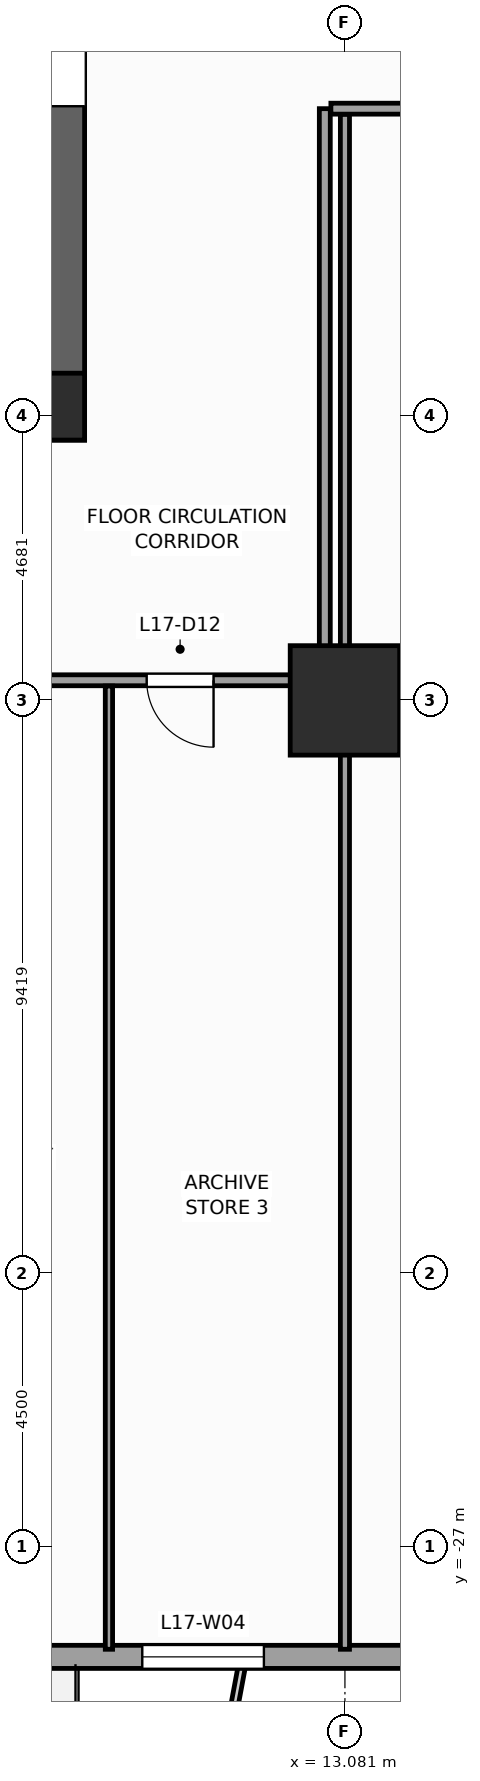
"""IFC4 building model, lengths in metres.
Left out: names, types, materials, properties, quantities, classifications, styles, units other than length and angle.
Written with IfcOpenShell. Run it as: python <this file> out.ifc"""

import sys

from ifc_helpers import new_model, si_unit, direction, frame, frame_2d, origin, origin_2d, place, context, subcontext, project, spatial, rectangle, extrude, source, transform, mapped, element, fill, save


model = new_model("IFC4")
c1 = context("Model", 3, precision=1e-05, world=origin(), true_north=direction((0.0, 1.0)))
c2 = subcontext(c1, "Body", "Model", "MODEL_VIEW")
j1 = project(units=[si_unit("LENGTHUNIT", "METRE"), si_unit("PLANEANGLEUNIT", "RADIAN")], contexts=[c1])
p1 = place(None, origin())
s1 = spatial("IfcSite", under=j1, at=p1, CompositionType="ELEMENT")
p2 = place(p1, origin())
s2 = spatial("IfcBuilding", under=s1, at=p2, CompositionType="ELEMENT")
p3 = place(p2, frame((0.0, 0.0, 74.0)))
s3 = spatial("IfcBuildingStorey", under=s2, at=p3, CompositionType="ELEMENT", Elevation=74.0)
p4 = place(p3, frame((-8.8, -8.4, 0.0), z_axis=(0.0, 0.0, 1.0), x_axis=(1.0, 0.0, 0.0)))
e1 = element("IfcWall", 1, at=p4, inside=s3, PredefinedType="SHEAR", context=c2, shape_type="SweptSolid", body=[
    extrude(rectangle(XDim=17.6, YDim=0.8, at=frame_2d((8.8, 0.0))), origin(), (0.0, 0.0, 1.0), 4.0),
])
p5 = place(p4, frame((8.15, 0.0, 0.0)))
e2 = element("IfcOpeningElement", 2, at=p5, cuts=e1, PredefinedType="OPENING", context=c2, shape_type="SweptSolid", body=[
    extrude(rectangle(XDim=1.3, YDim=2.2, at=frame_2d((0.65, 1.1))), frame((0.0, 0.41, 0.0), z_axis=(0.0, -1.0, 0.0), x_axis=(1.0, 0.0, 0.0)), (0.0, 0.0, 1.0), 0.82),
])
p6 = place(p3, frame((8.4, -8.0, 0.0), z_axis=(0.0, 0.0, 1.0), x_axis=(0.0, 1.0, 0.0)))
e3 = element("IfcWall", 3, at=p6, inside=s3, PredefinedType="SHEAR", context=c2, shape_type="SweptSolid", body=[
    extrude(rectangle(XDim=16.0, YDim=0.8, at=frame_2d((8.0, 0.0))), origin(), (0.0, 0.0, 1.0), 4.0),
])
p7 = place(p6, frame((4.69, 0.0, 0.0)))
e4 = element("IfcOpeningElement", 4, at=p7, cuts=e3, PredefinedType="OPENING", context=c2, shape_type="SweptSolid", body=[
    extrude(rectangle(XDim=1.3, YDim=2.2, at=frame_2d((0.65, 1.1))), frame((0.0, 0.41, 0.0), z_axis=(0.0, -1.0, 0.0), x_axis=(1.0, 0.0, 0.0)), (0.0, 0.0, 1.0), 0.82),
])
m1 = source(origin(), c2, "Body", "SweptSolid", [
    extrude(rectangle(XDim=1.1, YDim=1.1, at=origin_2d()), origin(), (0.0, 0.0, 1.0), 4.0),
])
p8 = place(p3, frame((8.25, -8.25, 0.0), z_axis=(0.0, 0.0, 1.0), x_axis=(1.0, 0.0, 0.0)))
e5 = element("IfcColumn", 5, at=p8, inside=s3, PredefinedType="PILASTER", context=c2, shape_type="MappedRepresentation", body=[
    mapped(m1, transform((0.0, 0.0, 0.0), scale=1.0)),
])
m2 = source(origin(), c2, "Body", "SweptSolid", [
    extrude(rectangle(XDim=1.8, YDim=1.8, at=origin_2d()), origin(), (0.0, 0.0, 1.0), 4.0),
])
p9 = place(p3, frame((13.081, -13.081, 0.0), z_axis=(0.0, 0.0, 1.0), x_axis=(1.0, 0.0, 0.0)))
e6 = element("IfcColumn", 6, at=p9, inside=s3, PredefinedType="COLUMN", context=c2, shape_type="MappedRepresentation", body=[
    mapped(m2, transform((0.0, 0.0, 0.0), scale=1.0)),
])
p10 = place(p3, frame((-25.69, -28.81, 0.0), z_axis=(0.0, 0.0, 1.0), x_axis=(1.0, 0.0, 0.0)))
e7 = element("IfcWall", 7, at=p10, inside=s3, PredefinedType="STANDARD", context=c2, shape_type="SweptSolid", body=[
    extrude(rectangle(XDim=51.38, YDim=0.38, at=frame_2d((25.69, 0.0))), origin(), (0.0, 0.0, 1.0), 2.2),
])
p11 = place(p10, frame((31.615, 0.0, 0.0)))
e8 = element("IfcOpeningElement", 8, at=p11, cuts=e7, PredefinedType="OPENING", context=c2, shape_type="SweptSolid", body=[
    extrude(rectangle(XDim=1.05, YDim=2.02, at=frame_2d((0.525, 1.01))), frame((0.0, 0.2, 0.0), z_axis=(0.0, -1.0, 0.0), x_axis=(1.0, 0.0, 0.0)), (0.0, 0.0, 1.0), 0.4),
])
p12 = place(p10, frame((5.166, 0.0, 0.67)))
e9 = element("IfcOpeningElement", 9, at=p12, cuts=e7, PredefinedType="OPENING", context=c2, shape_type="SweptSolid", body=[
    extrude(rectangle(XDim=2.0, YDim=1.45, at=frame_2d((1.0, 0.725))), frame((0.0, 0.2, 0.0), z_axis=(0.0, -1.0, 0.0), x_axis=(1.0, 0.0, 0.0)), (0.0, 0.0, 1.0), 0.4),
])
p13 = place(p10, frame((13.9, 0.0, 0.67)))
e10 = element("IfcOpeningElement", 10, at=p13, cuts=e7, PredefinedType="OPENING", context=c2, shape_type="SweptSolid", body=[
    extrude(rectangle(XDim=2.0, YDim=1.45, at=frame_2d((1.0, 0.725))), frame((0.0, 0.2, 0.0), z_axis=(0.0, -1.0, 0.0), x_axis=(1.0, 0.0, 0.0)), (0.0, 0.0, 1.0), 0.4),
])
p14 = place(p10, frame((22.912, 0.0, 0.67)))
e11 = element("IfcOpeningElement", 11, at=p14, cuts=e7, PredefinedType="OPENING", context=c2, shape_type="SweptSolid", body=[
    extrude(rectangle(XDim=2.0, YDim=1.45, at=frame_2d((1.0, 0.725))), frame((0.0, 0.2, 0.0), z_axis=(0.0, -1.0, 0.0), x_axis=(1.0, 0.0, 0.0)), (0.0, 0.0, 1.0), 0.4),
])
p15 = place(p10, frame((35.438, 0.0, 0.67)))
e12 = element("IfcOpeningElement", 12, at=p15, cuts=e7, PredefinedType="OPENING", context=c2, shape_type="SweptSolid", body=[
    extrude(rectangle(XDim=2.0, YDim=1.45, at=frame_2d((1.0, 0.725))), frame((0.0, 0.2, 0.0), z_axis=(0.0, -1.0, 0.0), x_axis=(1.0, 0.0, 0.0)), (0.0, 0.0, 1.0), 0.4),
])
p16 = place(p10, frame((43.187, 0.0, 0.67)))
e13 = element("IfcOpeningElement", 13, at=p16, cuts=e7, PredefinedType="OPENING", context=c2, shape_type="SweptSolid", body=[
    extrude(rectangle(XDim=2.0, YDim=1.45, at=frame_2d((1.0, 0.725))), frame((0.0, 0.2, 0.0), z_axis=(0.0, -1.0, 0.0), x_axis=(1.0, 0.0, 0.0)), (0.0, 0.0, 1.0), 0.4),
])
p17 = place(p3, frame((3.35, -12.75, 0.0), z_axis=(0.0, 0.0, 1.0), x_axis=(1.0, 0.0, 0.0)))
e14 = element("IfcWall", 14, at=p17, inside=s3, PredefinedType="PARTITIONING", context=c2, shape_type="SweptSolid", body=[
    extrude(rectangle(XDim=9.4, YDim=0.18, at=frame_2d((4.7, 0.0))), origin(), (0.0, 0.0, 1.0), 2.2),
])
p18 = place(p17, frame((3.45, 0.0, 0.0)))
e15 = element("IfcOpeningElement", 15, at=p18, cuts=e14, PredefinedType="OPENING", context=c2, shape_type="SweptSolid", body=[
    extrude(rectangle(XDim=1.1, YDim=2.2, at=frame_2d((0.55, 1.1))), frame((0.0, 0.1, 0.0), z_axis=(0.0, -1.0, 0.0), x_axis=(1.0, 0.0, 0.0)), (0.0, 0.0, 1.0), 0.2),
])
p19 = place(p17, frame((6.47, 0.0, 0.0)))
e16 = element("IfcOpeningElement", 16, at=p19, cuts=e14, PredefinedType="OPENING", context=c2, shape_type="SweptSolid", body=[
    extrude(rectangle(XDim=1.1, YDim=2.2, at=frame_2d((0.55, 1.1))), frame((0.0, 0.1, 0.0), z_axis=(0.0, -1.0, 0.0), x_axis=(1.0, 0.0, 0.0)), (0.0, 0.0, 1.0), 0.2),
])
p20 = place(p3, frame((12.75, -12.75, 0.0), z_axis=(0.0, 0.0, 1.0), x_axis=(0.0, 1.0, 0.0)))
e17 = element("IfcWall", 17, at=p20, inside=s3, PredefinedType="PARTITIONING", context=c2, shape_type="SweptSolid", body=[
    extrude(rectangle(XDim=9.4, YDim=0.18, at=frame_2d((4.7, 0.0))), origin(), (0.0, 0.0, 1.0), 2.2),
])
p21 = place(p3, frame((12.85, -3.35, 0.0), z_axis=(0.0, 0.0, 1.0), x_axis=(1.0, 0.0, 0.0)))
e18 = element("IfcWall", 18, at=p21, inside=s3, PredefinedType="PARTITIONING", context=c2, shape_type="SweptSolid", body=[
    extrude(rectangle(XDim=15.835, YDim=0.18, at=frame_2d((7.917, 0.0))), origin(), (0.0, 0.0, 1.0), 3.6),
])
p22 = place(p21, frame((7.367, 0.0, 0.0)))
e19 = element("IfcOpeningElement", 19, at=p22, cuts=e18, PredefinedType="OPENING", context=c2, shape_type="SweptSolid", body=[
    extrude(rectangle(XDim=1.1, YDim=2.2, at=frame_2d((0.55, 1.1))), frame((0.0, 0.1, 0.0), z_axis=(0.0, -1.0, 0.0), x_axis=(1.0, 0.0, 0.0)), (0.0, 0.0, 1.0), 0.2),
])
p23 = place(p3, frame((9.2, -28.685, 0.0), z_axis=(0.0, 0.0, 1.0), x_axis=(0.0, 1.0, 0.0)))
e20 = element("IfcWall", 20, at=p23, inside=s3, PredefinedType="PARTITIONING", context=c2, shape_type="SweptSolid", body=[
    extrude(rectangle(XDim=15.84, YDim=0.12, at=frame_2d((7.92, 0.0))), origin(), (0.0, 0.0, 1.0), 2.2),
])
p24 = place(p3, frame((13.081, -28.685, 0.0), z_axis=(0.0, 0.0, 1.0), x_axis=(0.0, 1.0, 0.0)))
e21 = element("IfcWall", 21, at=p24, inside=s3, PredefinedType="PARTITIONING", context=c2, shape_type="SweptSolid", body=[
    extrude(rectangle(XDim=25.24, YDim=0.15, at=frame_2d((12.62, 0.0))), origin(), (0.0, 0.0, 1.0), 2.2),
])
m3 = source(origin(), c2, "Body", "SweptSolid", [
    extrude(rectangle(XDim=2.0, YDim=1.45, at=frame_2d((1.0, 0.725))), frame((0.0, 0.03, 0.0), z_axis=(0.0, -1.0, 0.0), x_axis=(1.0, 0.0, 0.0)), (0.0, 0.0, 1.0), 0.06),
])
p25 = place(p15, origin())
e22 = element("IfcWindow", 22, at=p25, inside=s3, PartitioningType="SINGLE_PANEL", PredefinedType="WINDOW", context=c2, shape_type="MappedRepresentation", body=[
    mapped(m3, transform((0.0, 0.0, 0.0), scale=1.0)),
])
fill(e12, e22)
m4 = source(origin(), c2, "Body", "SweptSolid", [
    extrude(rectangle(XDim=1.3, YDim=2.2, at=frame_2d((0.65, 1.1))), frame((0.0, 0.025, 0.0), z_axis=(0.0, -1.0, 0.0), x_axis=(1.0, 0.0, 0.0)), (0.0, 0.0, 1.0), 0.05),
])
p26 = place(p7, origin())
e23 = element("IfcDoor", 23, at=p26, inside=s3, OperationType="SINGLE_SWING_RIGHT", PredefinedType="DOOR", context=c2, shape_type="MappedRepresentation", body=[
    mapped(m4, transform((0.0, 0.0, 0.0), scale=1.0)),
])
fill(e4, e23)
m5 = source(origin(), c2, "Body", "SweptSolid", [
    extrude(rectangle(XDim=1.1, YDim=2.2, at=frame_2d((0.55, 1.1))), frame((0.0, 0.025, 0.0), z_axis=(0.0, -1.0, 0.0), x_axis=(1.0, 0.0, 0.0)), (0.0, 0.0, 1.0), 0.05),
])
p27 = place(p19, frame((1.1, 0.0, 0.0), z_axis=(0.0, 0.0, 1.0), x_axis=(-1.0, 0.0, 0.0)))
e24 = element("IfcDoor", 24, at=p27, inside=s3, OperationType="SINGLE_SWING_RIGHT", PredefinedType="DOOR", context=c2, shape_type="MappedRepresentation", body=[
    mapped(m5, transform((0.0, 0.0, 0.0), scale=1.0)),
])
fill(e16, e24)
save(model, sys.argv[1])
